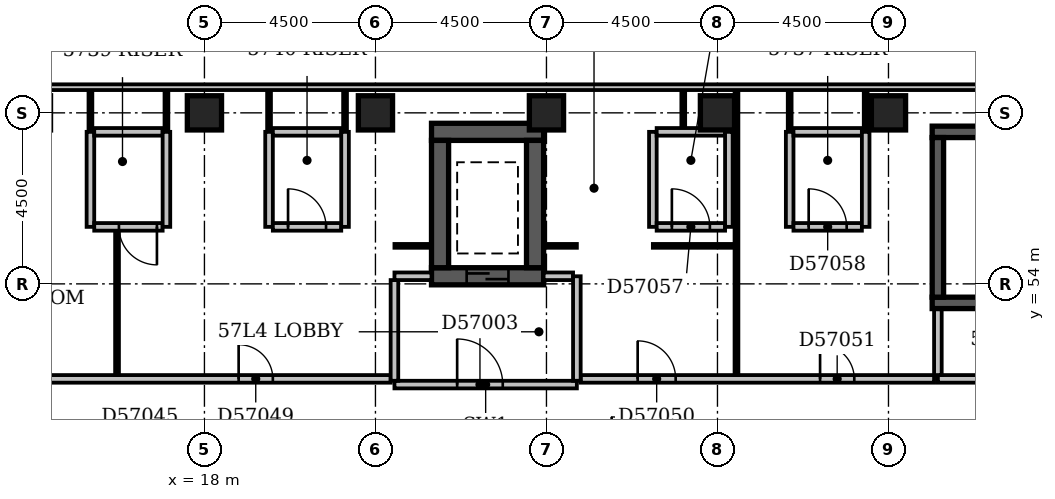
"""IFC4 building model, lengths in metres.
Left out: names, types, materials, properties, quantities, classifications, styles, units other than length and angle.
Written with IfcOpenShell. Run it as: python <this file> out.ifc"""

import sys

from ifc_helpers import new_model, si_unit, direction, frame, frame_2d, origin, origin_2d, place, context, subcontext, project, spatial, rectangle, extrude, element, fill, save


model = new_model("IFC4")
c1 = context("Model", 3, precision=1e-05, world=origin(), true_north=direction((0.0, 1.0)))
c2 = subcontext(c1, "Body", "Model", "MODEL_VIEW")
j1 = project(units=[si_unit("LENGTHUNIT", "METRE"), si_unit("PLANEANGLEUNIT", "RADIAN")], contexts=[c1])
p1 = place(None, origin())
s1 = spatial("IfcSite", under=j1, at=p1, CompositionType="ELEMENT")
p2 = place(p1, origin())
s2 = spatial("IfcBuilding", under=s1, at=p2, CompositionType="ELEMENT")
p3 = place(p2, frame((0.0, 0.0, 222.2)))
s3 = spatial("IfcBuildingStorey", under=s2, at=p3, CompositionType="ELEMENT", Elevation=222.2)
p4 = place(p3, frame((23.975, 54.2, -0.3), z_axis=(0.0, 0.0, 1.0), x_axis=(1.0, 0.0, 0.0)))
e1 = element("IfcWall", 1, at=p4, inside=s3, PredefinedType="SHEAR", context=c2, shape_type="SweptSolid", body=[
    extrude(rectangle(XDim=2.95, YDim=0.45, at=frame_2d((1.475, 0.0))), origin(), (0.0, 0.0, 1.0), 3.6),
])
p5 = place(p4, frame((0.925, 0.0, 0.3)))
e2 = element("IfcOpeningElement", 2, at=p5, cuts=e1, PredefinedType="OPENING", context=c2, shape_type="SweptSolid", body=[
    extrude(rectangle(XDim=1.1, YDim=2.1, at=frame_2d((0.55, 1.05))), frame((0.0, 0.237, 0.0), z_axis=(0.0, -1.0, 0.0), x_axis=(1.0, 0.0, 0.0)), (0.0, 0.0, 1.0), 0.474),
])
p6 = place(p3, frame((23.975, 58.0, -0.3), z_axis=(0.0, 0.0, 1.0), x_axis=(1.0, 0.0, 0.0)))
e3 = element("IfcWall", 3, at=p6, inside=s3, PredefinedType="SHEAR", context=c2, shape_type="SweptSolid", body=[
    extrude(rectangle(XDim=2.95, YDim=0.45, at=frame_2d((1.475, 0.0))), origin(), (0.0, 0.0, 1.0), 3.6),
])
for number, where, z_axis, x_axis in (
    (4, (24.2, 54.425, -0.3), (0.0, 0.0, 1.0), (0.0, 1.0, 0.0)),
    (5, (26.7, 54.425, -0.3), (0.0, 0.0, 1.0), (0.0, 1.0, 0.0)),
):
    element("IfcWall", number, at=place(p3, frame(where, z_axis=z_axis, x_axis=x_axis)), inside=s3, PredefinedType="SHEAR", context=c2, shape_type="SweptSolid", body=[
        extrude(rectangle(XDim=3.35, YDim=0.45, at=frame_2d((1.675, 0.0))), origin(), (0.0, 0.0, 1.0), 3.6),
    ])
p7 = place(p3, frame((37.15, 53.5, -0.3), z_axis=(0.0, 0.0, 1.0), x_axis=(1.0, 0.0, 0.0)))
e6 = element("IfcWall", 6, at=p7, inside=s3, PredefinedType="SHEAR", context=c2, shape_type="SweptSolid", body=[
    extrude(rectangle(XDim=7.0, YDim=0.3, at=frame_2d((3.5, 0.0))), origin(), (0.0, 0.0, 1.0), 3.6),
])
p8 = place(p7, frame((5.58, 0.0, 0.3)))
e7 = element("IfcOpeningElement", 7, at=p8, cuts=e6, PredefinedType="OPENING", context=c2, shape_type="SweptSolid", body=[
    extrude(rectangle(XDim=1.1, YDim=2.1, at=frame_2d((0.55, 1.05))), frame((0.0, 0.162, 0.0), z_axis=(0.0, -1.0, 0.0), x_axis=(1.0, 0.0, 0.0)), (0.0, 0.0, 1.0), 0.324),
])
p9 = place(p3, frame((37.15, 58.0, -0.3), z_axis=(0.0, 0.0, 1.0), x_axis=(1.0, 0.0, 0.0)))
e8 = element("IfcWall", 8, at=p9, inside=s3, PredefinedType="SHEAR", context=c2, shape_type="SweptSolid", body=[
    extrude(rectangle(XDim=7.4, YDim=0.3, at=frame_2d((3.7, 0.0))), origin(), (0.0, 0.0, 1.0), 3.6),
])
p10 = place(p3, frame((37.3, 53.65, -0.3), z_axis=(0.0, 0.0, 1.0), x_axis=(0.0, 1.0, 0.0)))
e9 = element("IfcWall", 9, at=p10, inside=s3, PredefinedType="SHEAR", context=c2, shape_type="SweptSolid", body=[
    extrude(rectangle(XDim=4.2, YDim=0.3, at=frame_2d((2.1, 0.0))), origin(), (0.0, 0.0, 1.0), 3.6),
])
for number, where, z_axis, x_axis in (
    (10, (18.0, 58.5, -0.3), (0.0, 0.0, 1.0), (1.0, 0.0, 0.0)),
    (11, (22.5, 58.5, -0.3), (0.0, 0.0, 1.0), (1.0, 0.0, 0.0)),
    (12, (27.0, 58.5, -0.3), (0.0, 0.0, 1.0), (1.0, 0.0, 0.0)),
    (13, (31.5, 58.5, -0.3), (0.0, 0.0, 1.0), (1.0, 0.0, 0.0)),
    (14, (36.0, 58.5, -0.3), (0.0, 0.0, 1.0), (1.0, 0.0, 0.0)),
):
    element("IfcColumn", number, at=place(p3, frame(where, z_axis=z_axis, x_axis=x_axis)), inside=s3, PredefinedType="COLUMN", context=c2, shape_type="SweptSolid", body=[
        extrude(rectangle(XDim=0.9, YDim=0.9, at=origin_2d()), origin(), (0.0, 0.0, 1.0), 3.6),
    ])
p11 = place(p3, frame((50.1, 59.175, 0.0), z_axis=(0.0, 0.0, 1.0), x_axis=(-1.0, 0.0, 0.0)))
e15 = element("IfcWall", 15, at=p11, inside=s3, PredefinedType="STANDARD", context=c2, shape_type="SweptSolid", body=[
    extrude(rectangle(XDim=50.85, YDim=0.15, at=frame_2d((25.425, 0.0))), origin(), (0.0, 0.0, 1.0), 2.7),
])
p12 = place(p3, frame((23.0, 51.35, 0.0), z_axis=(0.0, 0.0, 1.0), x_axis=(1.0, 0.0, 0.0)))
e16 = element("IfcWall", 16, at=p12, inside=s3, PredefinedType="PARTITIONING", context=c2, shape_type="SweptSolid", body=[
    extrude(rectangle(XDim=4.8, YDim=0.2, at=frame_2d((2.4, 0.0))), origin(), (0.0, 0.0, 1.0), 3.3),
])
p13 = place(p12, frame((1.65, 0.0, 0.0)))
e17 = element("IfcOpeningElement", 17, at=p13, cuts=e16, PredefinedType="OPENING", context=c2, shape_type="SweptSolid", body=[
    extrude(rectangle(XDim=1.2, YDim=2.1, at=frame_2d((0.6, 1.05))), frame((0.0, 0.112, 0.0), z_axis=(0.0, -1.0, 0.0), x_axis=(1.0, 0.0, 0.0)), (0.0, 0.0, 1.0), 0.224),
])
p14 = place(p3, frame((27.8, 51.45, 0.0), z_axis=(0.0, 0.0, 1.0), x_axis=(0.0, 1.0, 0.0)))
e18 = element("IfcWall", 18, at=p14, inside=s3, PredefinedType="PARTITIONING", context=c2, shape_type="SweptSolid", body=[
    extrude(rectangle(XDim=2.75, YDim=0.2, at=frame_2d((1.375, 0.0))), origin(), (0.0, 0.0, 1.0), 3.3),
])
p15 = place(p3, frame((23.0, 54.2, 0.0), z_axis=(0.0, 0.0, 1.0), x_axis=(1.0, 0.0, 0.0)))
e19 = element("IfcWall", 19, at=p15, inside=s3, PredefinedType="PARTITIONING", context=c2, shape_type="SweptSolid", body=[
    extrude(rectangle(XDim=0.975, YDim=0.2, at=frame_2d((0.488, 0.0))), origin(), (0.0, 0.0, 1.0), 3.3),
])
p16 = place(p3, frame((26.925, 54.2, 0.0), z_axis=(0.0, 0.0, 1.0), x_axis=(1.0, 0.0, 0.0)))
e20 = element("IfcWall", 20, at=p16, inside=s3, PredefinedType="PARTITIONING", context=c2, shape_type="SweptSolid", body=[
    extrude(rectangle(XDim=0.775, YDim=0.2, at=frame_2d((0.387, 0.0))), origin(), (0.0, 0.0, 1.0), 3.3),
])
p17 = place(p3, frame((23.0, 51.45, 0.0), z_axis=(0.0, 0.0, 1.0), x_axis=(0.0, 1.0, 0.0)))
e21 = element("IfcWall", 21, at=p17, inside=s3, PredefinedType="PARTITIONING", context=c2, shape_type="SweptSolid", body=[
    extrude(rectangle(XDim=2.65, YDim=0.2, at=frame_2d((1.325, 0.0))), origin(), (0.0, 0.0, 1.0), 3.3),
])
p18 = place(p3, frame((37.3, 51.5, 0.0), z_axis=(0.0, 0.0, 1.0), x_axis=(1.0, 0.0, 0.0)))
e22 = element("IfcWall", 22, at=p18, inside=s3, PredefinedType="PARTITIONING", context=c2, shape_type="SweptSolid", body=[
    extrude(rectangle(XDim=6.7, YDim=0.2, at=frame_2d((3.35, 0.0))), origin(), (0.0, 0.0, 1.0), 3.3),
])
p19 = place(p18, frame((2.75, 0.0, 0.0)))
e23 = element("IfcOpeningElement", 23, at=p19, cuts=e22, PredefinedType="OPENING", context=c2, shape_type="SweptSolid", body=[
    extrude(rectangle(XDim=1.2, YDim=2.1, at=frame_2d((0.6, 1.05))), frame((0.0, 0.112, 0.0), z_axis=(0.0, -1.0, 0.0), x_axis=(1.0, 0.0, 0.0)), (0.0, 0.0, 1.0), 0.224),
])
p20 = place(p3, frame((37.3, 51.6, 0.0), z_axis=(0.0, 0.0, 1.0), x_axis=(0.0, 1.0, 0.0)))
e24 = element("IfcWall", 24, at=p20, inside=s3, PredefinedType="PARTITIONING", context=c2, shape_type="SweptSolid", body=[
    extrude(rectangle(XDim=1.73, YDim=0.2, at=frame_2d((0.865, 0.0))), origin(), (0.0, 0.0, 1.0), 3.3),
])
p21 = place(p3, frame((7.6, 51.5, 0.0), z_axis=(0.0, 0.0, 1.0), x_axis=(1.0, 0.0, 0.0)))
e25 = element("IfcWall", 25, at=p21, inside=s3, PredefinedType="PARTITIONING", context=c2, shape_type="SweptSolid", body=[
    extrude(rectangle(XDim=15.3, YDim=0.2, at=frame_2d((7.65, 0.0))), origin(), (0.0, 0.0, 1.0), 3.3),
])
p22 = place(p21, frame((3.55, 0.0, 0.0)))
e26 = element("IfcOpeningElement", 26, at=p22, cuts=e25, PredefinedType="OPENING", context=c2, shape_type="SweptSolid", body=[
    extrude(rectangle(XDim=0.9, YDim=2.1, at=frame_2d((0.45, 1.05))), frame((0.0, 0.112, 0.0), z_axis=(0.0, -1.0, 0.0), x_axis=(1.0, 0.0, 0.0)), (0.0, 0.0, 1.0), 0.224),
])
p23 = place(p21, frame((11.3, 0.0, 0.0)))
e27 = element("IfcOpeningElement", 27, at=p23, cuts=e25, PredefinedType="OPENING", context=c2, shape_type="SweptSolid", body=[
    extrude(rectangle(XDim=0.9, YDim=2.1, at=frame_2d((0.45, 1.05))), frame((0.0, 0.112, 0.0), z_axis=(0.0, -1.0, 0.0), x_axis=(1.0, 0.0, 0.0)), (0.0, 0.0, 1.0), 0.224),
])
p24 = place(p3, frame((27.9, 51.5, 0.0), z_axis=(0.0, 0.0, 1.0), x_axis=(1.0, 0.0, 0.0)))
e28 = element("IfcWall", 28, at=p24, inside=s3, PredefinedType="PARTITIONING", context=c2, shape_type="SweptSolid", body=[
    extrude(rectangle(XDim=9.3, YDim=0.2, at=frame_2d((4.65, 0.0))), origin(), (0.0, 0.0, 1.0), 3.3),
])
p25 = place(p24, frame((1.5, 0.0, 0.0)))
e29 = element("IfcOpeningElement", 29, at=p25, cuts=e28, PredefinedType="OPENING", context=c2, shape_type="SweptSolid", body=[
    extrude(rectangle(XDim=1.0, YDim=2.1, at=frame_2d((0.5, 1.05))), frame((0.0, 0.112, 0.0), z_axis=(0.0, -1.0, 0.0), x_axis=(1.0, 0.0, 0.0)), (0.0, 0.0, 1.0), 0.224),
])
p26 = place(p24, frame((6.3, 0.0, 0.0)))
e30 = element("IfcOpeningElement", 30, at=p26, cuts=e28, PredefinedType="OPENING", context=c2, shape_type="SweptSolid", body=[
    extrude(rectangle(XDim=0.9, YDim=2.1, at=frame_2d((0.45, 1.05))), frame((0.0, 0.112, 0.0), z_axis=(0.0, -1.0, 0.0), x_axis=(1.0, 0.0, 0.0)), (0.0, 0.0, 1.0), 0.224),
])
p27 = place(p3, frame((15.7, 51.6, 0.0), z_axis=(0.0, 0.0, 1.0), x_axis=(0.0, 1.0, 0.0)))
e31 = element("IfcWall", 31, at=p27, inside=s3, PredefinedType="PARTITIONING", context=c2, shape_type="SweptSolid", body=[
    extrude(rectangle(XDim=3.8, YDim=0.1, at=frame_2d((1.9, 0.0))), origin(), (0.0, 0.0, 1.0), 3.3),
])
p28 = place(p3, frame((32.0, 51.6, 0.0), z_axis=(0.0, 0.0, 1.0), x_axis=(0.0, 1.0, 0.0)))
e32 = element("IfcWall", 32, at=p28, inside=s3, PredefinedType="PARTITIONING", context=c2, shape_type="SweptSolid", body=[
    extrude(rectangle(XDim=7.5, YDim=0.1, at=frame_2d((3.75, 0.0))), origin(), (0.0, 0.0, 1.0), 3.3),
])
p29 = place(p3, frame((23.0, 55.0, 0.0), z_axis=(0.0, 0.0, 1.0), x_axis=(1.0, 0.0, 0.0)))
e33 = element("IfcWall", 33, at=p29, inside=s3, PredefinedType="PARTITIONING", context=c2, shape_type="SweptSolid", body=[
    extrude(rectangle(XDim=0.975, YDim=0.1, at=frame_2d((0.488, 0.0))), origin(), (0.0, 0.0, 1.0), 3.3),
])
p30 = place(p3, frame((26.925, 55.0, 0.0), z_axis=(0.0, 0.0, 1.0), x_axis=(1.0, 0.0, 0.0)))
e34 = element("IfcWall", 34, at=p30, inside=s3, PredefinedType="PARTITIONING", context=c2, shape_type="SweptSolid", body=[
    extrude(rectangle(XDim=0.875, YDim=0.1, at=frame_2d((0.438, 0.0))), origin(), (0.0, 0.0, 1.0), 3.3),
])
p31 = place(p3, frame((29.8, 55.0, 0.0), z_axis=(0.0, 0.0, 1.0), x_axis=(1.0, 0.0, 0.0)))
e35 = element("IfcWall", 35, at=p31, inside=s3, PredefinedType="PARTITIONING", context=c2, shape_type="SweptSolid", body=[
    extrude(rectangle(XDim=2.15, YDim=0.1, at=frame_2d((1.075, 0.0))), origin(), (0.0, 0.0, 1.0), 3.3),
])
p32 = place(p3, frame((15.0, 55.5, 0.0), z_axis=(0.0, 0.0, 1.0), x_axis=(0.0, 1.0, 0.0)))
e36 = element("IfcWall", 36, at=p32, inside=s3, PredefinedType="PARTITIONING", context=c2, shape_type="SweptSolid", body=[
    extrude(rectangle(XDim=2.5, YDim=0.2, at=frame_2d((1.25, 0.0))), origin(), (0.0, 0.0, 1.0), 3.3),
])
p33 = place(p3, frame((15.1, 55.5, 0.0), z_axis=(0.0, 0.0, 1.0), x_axis=(1.0, 0.0, 0.0)))
e37 = element("IfcWall", 37, at=p33, inside=s3, PredefinedType="PARTITIONING", context=c2, shape_type="SweptSolid", body=[
    extrude(rectangle(XDim=1.8, YDim=0.2, at=frame_2d((0.9, 0.0))), origin(), (0.0, 0.0, 1.0), 3.3),
])
p34 = place(p33, frame((0.65, 0.0, 0.0)))
e38 = element("IfcOpeningElement", 38, at=p34, cuts=e37, PredefinedType="OPENING", context=c2, shape_type="SweptSolid", body=[
    extrude(rectangle(XDim=1.0, YDim=2.1, at=frame_2d((0.5, 1.05))), frame((0.0, 0.112, 0.0), z_axis=(0.0, -1.0, 0.0), x_axis=(1.0, 0.0, 0.0)), (0.0, 0.0, 1.0), 0.224),
])
for number, where, z_axis, x_axis in (
    (39, (17.0, 55.5, 0.0), (0.0, 0.0, 1.0), (0.0, 1.0, 0.0)),
    (40, (19.7, 55.5, 0.0), (0.0, 0.0, 1.0), (0.0, 1.0, 0.0)),
):
    element("IfcWall", number, at=place(p3, frame(where, z_axis=z_axis, x_axis=x_axis)), inside=s3, PredefinedType="PARTITIONING", context=c2, shape_type="SweptSolid", body=[
        extrude(rectangle(XDim=2.5, YDim=0.2, at=frame_2d((1.25, 0.0))), origin(), (0.0, 0.0, 1.0), 3.3),
    ])
p35 = place(p3, frame((19.8, 55.5, 0.0), z_axis=(0.0, 0.0, 1.0), x_axis=(1.0, 0.0, 0.0)))
e41 = element("IfcWall", 41, at=p35, inside=s3, PredefinedType="PARTITIONING", context=c2, shape_type="SweptSolid", body=[
    extrude(rectangle(XDim=1.8, YDim=0.2, at=frame_2d((0.9, 0.0))), origin(), (0.0, 0.0, 1.0), 3.3),
])
p36 = place(p35, frame((0.4, 0.0, 0.0)))
e42 = element("IfcOpeningElement", 42, at=p36, cuts=e41, PredefinedType="OPENING", context=c2, shape_type="SweptSolid", body=[
    extrude(rectangle(XDim=1.0, YDim=2.1, at=frame_2d((0.5, 1.05))), frame((0.0, 0.112, 0.0), z_axis=(0.0, -1.0, 0.0), x_axis=(1.0, 0.0, 0.0)), (0.0, 0.0, 1.0), 0.224),
])
for number, where, z_axis, x_axis in (
    (43, (21.7, 55.5, 0.0), (0.0, 0.0, 1.0), (0.0, 1.0, 0.0)),
    (44, (29.8, 55.5, 0.0), (0.0, 0.0, 1.0), (0.0, 1.0, 0.0)),
):
    element("IfcWall", number, at=place(p3, frame(where, z_axis=z_axis, x_axis=x_axis)), inside=s3, PredefinedType="PARTITIONING", context=c2, shape_type="SweptSolid", body=[
        extrude(rectangle(XDim=2.5, YDim=0.2, at=frame_2d((1.25, 0.0))), origin(), (0.0, 0.0, 1.0), 3.3),
    ])
p37 = place(p3, frame((29.9, 55.5, 0.0), z_axis=(0.0, 0.0, 1.0), x_axis=(1.0, 0.0, 0.0)))
e45 = element("IfcWall", 45, at=p37, inside=s3, PredefinedType="PARTITIONING", context=c2, shape_type="SweptSolid", body=[
    extrude(rectangle(XDim=1.8, YDim=0.2, at=frame_2d((0.9, 0.0))), origin(), (0.0, 0.0, 1.0), 3.3),
])
p38 = place(p37, frame((0.4, 0.0, 0.0)))
e46 = element("IfcOpeningElement", 46, at=p38, cuts=e45, PredefinedType="OPENING", context=c2, shape_type="SweptSolid", body=[
    extrude(rectangle(XDim=1.0, YDim=2.1, at=frame_2d((0.5, 1.05))), frame((0.0, 0.112, 0.0), z_axis=(0.0, -1.0, 0.0), x_axis=(1.0, 0.0, 0.0)), (0.0, 0.0, 1.0), 0.224),
])
for number, where, z_axis, x_axis in (
    (47, (31.8, 55.5, 0.0), (0.0, 0.0, 1.0), (0.0, 1.0, 0.0)),
    (48, (33.4, 55.5, 0.0), (0.0, 0.0, 1.0), (0.0, 1.0, 0.0)),
):
    element("IfcWall", number, at=place(p3, frame(where, z_axis=z_axis, x_axis=x_axis)), inside=s3, PredefinedType="PARTITIONING", context=c2, shape_type="SweptSolid", body=[
        extrude(rectangle(XDim=2.5, YDim=0.2, at=frame_2d((1.25, 0.0))), origin(), (0.0, 0.0, 1.0), 3.3),
    ])
p39 = place(p3, frame((33.5, 55.5, 0.0), z_axis=(0.0, 0.0, 1.0), x_axis=(1.0, 0.0, 0.0)))
e49 = element("IfcWall", 49, at=p39, inside=s3, PredefinedType="PARTITIONING", context=c2, shape_type="SweptSolid", body=[
    extrude(rectangle(XDim=1.8, YDim=0.2, at=frame_2d((0.9, 0.0))), origin(), (0.0, 0.0, 1.0), 3.3),
])
p40 = place(p39, frame((0.4, 0.0, 0.0)))
e50 = element("IfcOpeningElement", 50, at=p40, cuts=e49, PredefinedType="OPENING", context=c2, shape_type="SweptSolid", body=[
    extrude(rectangle(XDim=1.0, YDim=2.1, at=frame_2d((0.5, 1.05))), frame((0.0, 0.112, 0.0), z_axis=(0.0, -1.0, 0.0), x_axis=(1.0, 0.0, 0.0)), (0.0, 0.0, 1.0), 0.224),
])
p41 = place(p3, frame((35.4, 55.5, 0.0), z_axis=(0.0, 0.0, 1.0), x_axis=(0.0, 1.0, 0.0)))
e51 = element("IfcWall", 51, at=p41, inside=s3, PredefinedType="PARTITIONING", context=c2, shape_type="SweptSolid", body=[
    extrude(rectangle(XDim=2.5, YDim=0.2, at=frame_2d((1.25, 0.0))), origin(), (0.0, 0.0, 1.0), 2.4),
])
p42 = place(p3, frame((15.0, 58.0, 0.0), z_axis=(0.0, 0.0, 1.0), x_axis=(0.0, 1.0, 0.0)))
e52 = element("IfcWall", 52, at=p42, inside=s3, PredefinedType="PARTITIONING", context=c2, shape_type="SweptSolid", body=[
    extrude(rectangle(XDim=1.1, YDim=0.1, at=frame_2d((0.55, 0.0))), origin(), (0.0, 0.0, 1.0), 3.3),
])
p43 = place(p3, frame((15.1, 58.0, 0.0), z_axis=(0.0, 0.0, 1.0), x_axis=(1.0, 0.0, 0.0)))
e53 = element("IfcWall", 53, at=p43, inside=s3, PredefinedType="PARTITIONING", context=c2, shape_type="SweptSolid", body=[
    extrude(rectangle(XDim=1.8, YDim=0.2, at=frame_2d((0.9, 0.0))), origin(), (0.0, 0.0, 1.0), 3.3),
])
for number, where, z_axis, x_axis in (
    (54, (17.0, 58.0, 0.0), (0.0, 0.0, 1.0), (0.0, 1.0, 0.0)),
    (55, (19.7, 58.0, 0.0), (0.0, 0.0, 1.0), (0.0, 1.0, 0.0)),
):
    element("IfcWall", number, at=place(p3, frame(where, z_axis=z_axis, x_axis=x_axis)), inside=s3, PredefinedType="PARTITIONING", context=c2, shape_type="SweptSolid", body=[
        extrude(rectangle(XDim=1.1, YDim=0.1, at=frame_2d((0.55, 0.0))), origin(), (0.0, 0.0, 1.0), 3.3),
    ])
p44 = place(p3, frame((19.8, 58.0, 0.0), z_axis=(0.0, 0.0, 1.0), x_axis=(1.0, 0.0, 0.0)))
e56 = element("IfcWall", 56, at=p44, inside=s3, PredefinedType="PARTITIONING", context=c2, shape_type="SweptSolid", body=[
    extrude(rectangle(XDim=1.8, YDim=0.2, at=frame_2d((0.9, 0.0))), origin(), (0.0, 0.0, 1.0), 3.3),
])
p45 = place(p3, frame((21.7, 58.0, 0.0), z_axis=(0.0, 0.0, 1.0), x_axis=(0.0, 1.0, 0.0)))
e57 = element("IfcWall", 57, at=p45, inside=s3, PredefinedType="PARTITIONING", context=c2, shape_type="SweptSolid", body=[
    extrude(rectangle(XDim=1.1, YDim=0.1, at=frame_2d((0.55, 0.0))), origin(), (0.0, 0.0, 1.0), 3.3),
])
p46 = place(p3, frame((29.9, 58.0, 0.0), z_axis=(0.0, 0.0, 1.0), x_axis=(1.0, 0.0, 0.0)))
e58 = element("IfcWall", 58, at=p46, inside=s3, PredefinedType="PARTITIONING", context=c2, shape_type="SweptSolid", body=[
    extrude(rectangle(XDim=1.8, YDim=0.2, at=frame_2d((0.9, 0.0))), origin(), (0.0, 0.0, 1.0), 3.3),
])
p47 = place(p3, frame((33.4, 58.0, 0.0), z_axis=(0.0, 0.0, 1.0), x_axis=(0.0, 1.0, 0.0)))
e59 = element("IfcWall", 59, at=p47, inside=s3, PredefinedType="PARTITIONING", context=c2, shape_type="SweptSolid", body=[
    extrude(rectangle(XDim=1.1, YDim=0.1, at=frame_2d((0.55, 0.0))), origin(), (0.0, 0.0, 1.0), 3.3),
])
p48 = place(p3, frame((33.5, 58.0, 0.0), z_axis=(0.0, 0.0, 1.0), x_axis=(1.0, 0.0, 0.0)))
e60 = element("IfcWall", 60, at=p48, inside=s3, PredefinedType="PARTITIONING", context=c2, shape_type="SweptSolid", body=[
    extrude(rectangle(XDim=1.8, YDim=0.2, at=frame_2d((0.9, 0.0))), origin(), (0.0, 0.0, 1.0), 3.3),
])
p49 = place(p3, frame((35.4, 58.0, 0.0), z_axis=(0.0, 0.0, 1.0), x_axis=(0.0, 1.0, 0.0)))
e61 = element("IfcWall", 61, at=p49, inside=s3, PredefinedType="PARTITIONING", context=c2, shape_type="SweptSolid", body=[
    extrude(rectangle(XDim=1.1, YDim=0.1, at=frame_2d((0.55, 0.0))), origin(), (0.0, 0.0, 1.0), 2.4),
])
p50 = place(p3, frame((30.6, 58.1, 0.0), z_axis=(0.0, 0.0, 1.0), x_axis=(0.0, 1.0, 0.0)))
e62 = element("IfcWall", 62, at=p50, inside=s3, PredefinedType="PARTITIONING", context=c2, shape_type="SweptSolid", body=[
    extrude(rectangle(XDim=1.0, YDim=0.1, at=frame_2d((0.5, 0.0))), origin(), (0.0, 0.0, 1.0), 3.3),
])
p51 = place(p13, origin())
e63 = element("IfcDoor", 63, at=p51, inside=s3, OperationType="SINGLE_SWING_LEFT", PredefinedType="DOOR", context=c2, shape_type="SweptSolid", body=[
    extrude(rectangle(XDim=1.2, YDim=2.1, at=frame_2d((0.6, 1.05))), frame((0.0, 0.025, 0.0), z_axis=(0.0, -1.0, 0.0), x_axis=(1.0, 0.0, 0.0)), (0.0, 0.0, 1.0), 0.05),
])
fill(e17, e63)
p52 = place(p5, origin())
e64 = element("IfcDoor", 64, at=p52, inside=s3, OperationType="SLIDING_TO_LEFT", PredefinedType="DOOR", context=c2, shape_type="SweptSolid", body=[
    extrude(rectangle(XDim=1.1, YDim=2.1, at=frame_2d((0.55, 1.05))), frame((0.0, 0.025, 0.0), z_axis=(0.0, -1.0, 0.0), x_axis=(1.0, 0.0, 0.0)), (0.0, 0.0, 1.0), 0.05),
])
fill(e2, e64)
p53 = place(p23, origin())
e65 = element("IfcDoor", 65, at=p53, inside=s3, OperationType="SINGLE_SWING_LEFT", PredefinedType="DOOR", context=c2, shape_type="SweptSolid", body=[
    extrude(rectangle(XDim=0.9, YDim=2.1, at=frame_2d((0.45, 1.05))), frame((0.0, 0.025, 0.0), z_axis=(0.0, -1.0, 0.0), x_axis=(1.0, 0.0, 0.0)), (0.0, 0.0, 1.0), 0.05),
])
fill(e27, e65)
p54 = place(p25, origin())
e66 = element("IfcDoor", 66, at=p54, inside=s3, OperationType="SINGLE_SWING_LEFT", PredefinedType="DOOR", context=c2, shape_type="SweptSolid", body=[
    extrude(rectangle(XDim=1.0, YDim=2.1, at=frame_2d((0.5, 1.05))), frame((0.0, 0.025, 0.0), z_axis=(0.0, -1.0, 0.0), x_axis=(1.0, 0.0, 0.0)), (0.0, 0.0, 1.0), 0.05),
])
fill(e29, e66)
p55 = place(p26, origin())
e67 = element("IfcDoor", 67, at=p55, inside=s3, OperationType="SINGLE_SWING_LEFT", PredefinedType="DOOR", context=c2, shape_type="SweptSolid", body=[
    extrude(rectangle(XDim=0.9, YDim=2.1, at=frame_2d((0.45, 1.05))), frame((0.0, 0.025, 0.0), z_axis=(0.0, -1.0, 0.0), x_axis=(1.0, 0.0, 0.0)), (0.0, 0.0, 1.0), 0.05),
])
fill(e30, e67)
p56 = place(p34, origin())
e68 = element("IfcDoor", 68, at=p56, inside=s3, OperationType="SINGLE_SWING_RIGHT", PredefinedType="DOOR", context=c2, shape_type="SweptSolid", body=[
    extrude(rectangle(XDim=1.0, YDim=2.1, at=frame_2d((0.5, 1.05))), frame((0.0, 0.025, 0.0), z_axis=(0.0, -1.0, 0.0), x_axis=(1.0, 0.0, 0.0)), (0.0, 0.0, 1.0), 0.05),
])
fill(e38, e68)
p57 = place(p36, origin())
e69 = element("IfcDoor", 69, at=p57, inside=s3, OperationType="SINGLE_SWING_LEFT", PredefinedType="DOOR", context=c2, shape_type="SweptSolid", body=[
    extrude(rectangle(XDim=1.0, YDim=2.1, at=frame_2d((0.5, 1.05))), frame((0.0, 0.025, 0.0), z_axis=(0.0, -1.0, 0.0), x_axis=(1.0, 0.0, 0.0)), (0.0, 0.0, 1.0), 0.05),
])
fill(e42, e69)
p58 = place(p38, origin())
e70 = element("IfcDoor", 70, at=p58, inside=s3, OperationType="SINGLE_SWING_LEFT", PredefinedType="DOOR", context=c2, shape_type="SweptSolid", body=[
    extrude(rectangle(XDim=1.0, YDim=2.1, at=frame_2d((0.5, 1.05))), frame((0.0, 0.025, 0.0), z_axis=(0.0, -1.0, 0.0), x_axis=(1.0, 0.0, 0.0)), (0.0, 0.0, 1.0), 0.05),
])
fill(e46, e70)
p59 = place(p40, origin())
e71 = element("IfcDoor", 71, at=p59, inside=s3, OperationType="SINGLE_SWING_LEFT", PredefinedType="DOOR", context=c2, shape_type="SweptSolid", body=[
    extrude(rectangle(XDim=1.0, YDim=2.1, at=frame_2d((0.5, 1.05))), frame((0.0, 0.025, 0.0), z_axis=(0.0, -1.0, 0.0), x_axis=(1.0, 0.0, 0.0)), (0.0, 0.0, 1.0), 0.05),
])
fill(e50, e71)
save(model, sys.argv[1])
